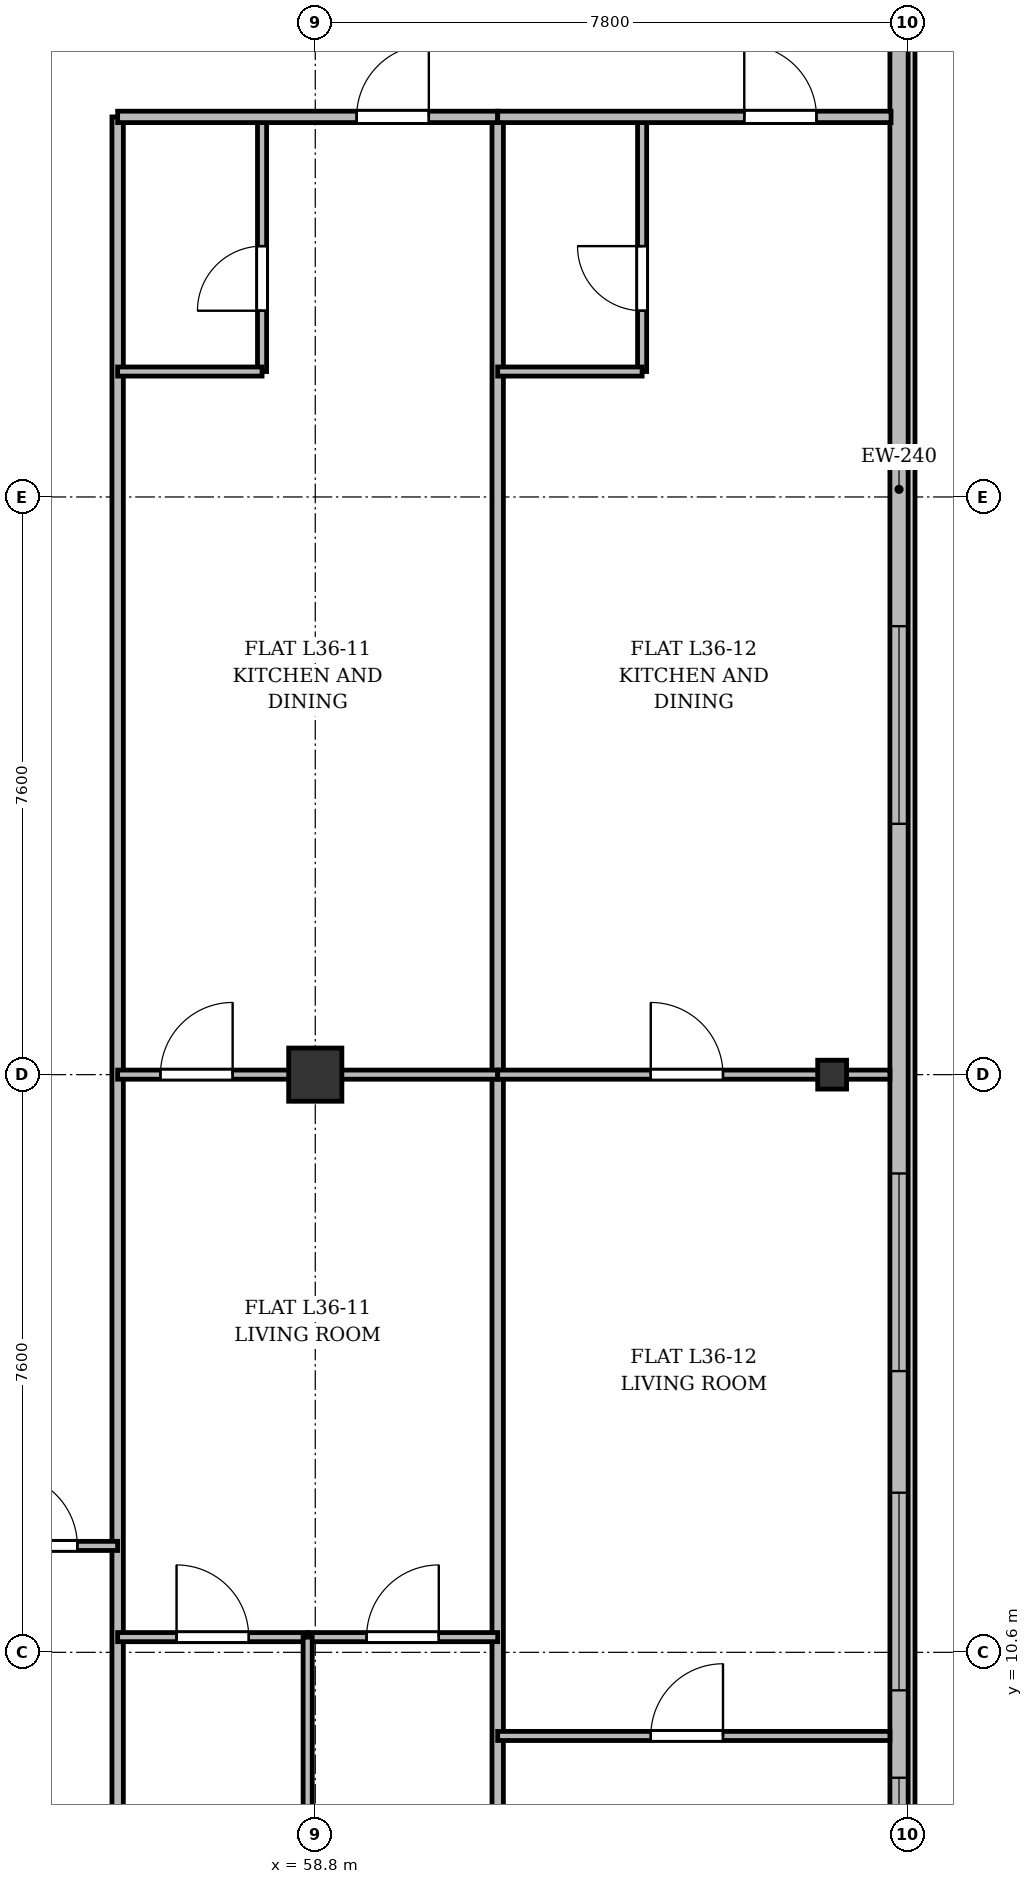
"""IFC4 building model, lengths in metres.
Left out: names, types, materials, properties, quantities, classifications, styles, units other than length and angle.
Written with IfcOpenShell. Run it as: python <this file> out.ifc"""

import sys

from ifc_helpers import new_model, si_unit, direction, frame, frame_2d, origin, origin_2d, place, context, subcontext, project, spatial, rectangle, i_section, extrude, source, transform, mapped, element, fill, save


model = new_model("IFC4")
c1 = context("Model", 3, precision=1e-05, world=origin(), true_north=direction((0.0, 1.0)))
c2 = subcontext(c1, "Body", "Model", "MODEL_VIEW")
j1 = project(units=[si_unit("LENGTHUNIT", "METRE"), si_unit("PLANEANGLEUNIT", "RADIAN")], contexts=[c1])
p1 = place(None, origin())
s1 = spatial("IfcSite", under=j1, at=p1, CompositionType="ELEMENT")
p2 = place(p1, origin())
s2 = spatial("IfcBuilding", under=s1, at=p2, CompositionType="ELEMENT")
p3 = place(p2, frame((0.0, 0.0, 139.3)))
s3 = spatial("IfcBuildingStorey", under=s2, at=p3, CompositionType="ELEMENT", Elevation=139.3)
m1 = source(origin(), c2, "Body", "SweptSolid", [
    extrude(rectangle(XDim=0.7, YDim=0.7, at=origin_2d()), origin(), (0.0, 0.0, 1.0), 3.6),
])
p4 = place(p3, frame((58.8, 18.2, 0.0), z_axis=(0.0, 0.0, 1.0), x_axis=(1.0, 0.0, 0.0)))
e1 = element("IfcColumn", 1, at=p4, inside=s3, PredefinedType="COLUMN", context=c2, shape_type="MappedRepresentation", body=[
    mapped(m1, transform((0.0, 0.0, 0.0), x_axis=(1.0, 0.0, 0.0), y_axis=(0.0, 1.0, 0.0), z_axis=(0.0, 0.0, 1.0), scale=1.0)),
])
m2 = source(origin(), c2, "Body", "SweptSolid", [
    extrude(i_section(OverallWidth=0.38, OverallDepth=0.38, WebThickness=0.02, FlangeThickness=0.03, at=origin_2d()), origin(), (0.0, 0.0, 1.0), 3.6),
])
p5 = place(p3, frame((65.6, 18.2, 0.0), z_axis=(0.0, 0.0, 1.0), x_axis=(1.0, 0.0, 0.0)))
e2 = element("IfcColumn", 2, at=p5, inside=s3, PredefinedType="COLUMN", context=c2, shape_type="MappedRepresentation", body=[
    mapped(m2, transform((0.0, 0.0, 0.0), x_axis=(1.0, 0.0, 0.0), y_axis=(0.0, 1.0, 0.0), z_axis=(0.0, 0.0, 1.0), scale=1.0)),
])
p6 = place(p3, frame((66.48, 45.5, 0.0), z_axis=(0.0, 0.0, 1.0), x_axis=(0.0, -1.0, 0.0)))
e3 = element("IfcWall", 3, at=p6, inside=s3, PredefinedType="SOLIDWALL", context=c2, shape_type="SweptSolid", body=[
    extrude(rectangle(XDim=39.2, YDim=0.24, at=frame_2d((19.6, 0.0))), origin(), (0.0, 0.0, 1.0), 3.35),
])
p7 = place(p6, frame((36.55, 0.0, 0.92)))
e4 = element("IfcOpeningElement", 4, at=p7, cuts=e3, PredefinedType="OPENING", context=c2, shape_type="SweptSolid", body=[
    extrude(rectangle(XDim=1.2, YDim=1.65, at=frame_2d((0.6, 0.825))), frame((0.0, 0.13, 0.0), z_axis=(0.0, -1.0, 0.0), x_axis=(1.0, 0.0, 0.0)), (0.0, 0.0, 1.0), 0.26),
])
p8 = place(p6, frame((32.8, 0.0, 0.92)))
e5 = element("IfcOpeningElement", 5, at=p8, cuts=e3, PredefinedType="OPENING", context=c2, shape_type="SweptSolid", body=[
    extrude(rectangle(XDim=2.6, YDim=1.9, at=frame_2d((1.3, 0.95))), frame((0.0, 0.13, 0.0), z_axis=(0.0, -1.0, 0.0), x_axis=(1.0, 0.0, 0.0)), (0.0, 0.0, 1.0), 0.26),
])
p9 = place(p6, frame((28.6, 0.0, 0.92)))
e6 = element("IfcOpeningElement", 6, at=p9, cuts=e3, PredefinedType="OPENING", context=c2, shape_type="SweptSolid", body=[
    extrude(rectangle(XDim=2.6, YDim=1.9, at=frame_2d((1.3, 0.95))), frame((0.0, 0.13, 0.0), z_axis=(0.0, -1.0, 0.0), x_axis=(1.0, 0.0, 0.0)), (0.0, 0.0, 1.0), 0.26),
])
p10 = place(p6, frame((21.4, 0.0, 0.92)))
e7 = element("IfcOpeningElement", 7, at=p10, cuts=e3, PredefinedType="OPENING", context=c2, shape_type="SweptSolid", body=[
    extrude(rectangle(XDim=2.6, YDim=1.9, at=frame_2d((1.3, 0.95))), frame((0.0, 0.13, 0.0), z_axis=(0.0, -1.0, 0.0), x_axis=(1.0, 0.0, 0.0)), (0.0, 0.0, 1.0), 0.26),
])
p11 = place(p6, frame((7.4, 0.0, 0.92)))
e8 = element("IfcOpeningElement", 8, at=p11, cuts=e3, PredefinedType="OPENING", context=c2, shape_type="SweptSolid", body=[
    extrude(rectangle(XDim=2.6, YDim=1.9, at=frame_2d((1.3, 0.95))), frame((0.0, 0.13, 0.0), z_axis=(0.0, -1.0, 0.0), x_axis=(1.0, 0.0, 0.0)), (0.0, 0.0, 1.0), 0.26),
])
p12 = place(p6, frame((4.5, 0.0, 0.92)))
e9 = element("IfcOpeningElement", 9, at=p12, cuts=e3, PredefinedType="OPENING", context=c2, shape_type="SweptSolid", body=[
    extrude(rectangle(XDim=1.2, YDim=1.65, at=frame_2d((0.6, 0.825))), frame((0.0, 0.13, 0.0), z_axis=(0.0, -1.0, 0.0), x_axis=(1.0, 0.0, 0.0)), (0.0, 0.0, 1.0), 0.26),
])
p13 = place(p6, frame((1.15, 0.0, 0.92)))
e10 = element("IfcOpeningElement", 10, at=p13, cuts=e3, PredefinedType="OPENING", context=c2, shape_type="SweptSolid", body=[
    extrude(rectangle(XDim=1.2, YDim=1.65, at=frame_2d((0.6, 0.825))), frame((0.0, 0.13, 0.0), z_axis=(0.0, -1.0, 0.0), x_axis=(1.0, 0.0, 0.0)), (0.0, 0.0, 1.0), 0.26),
])
for number, where, z_axis, x_axis in (
    (11, (61.2, 3.525, 0.0), (0.0, 0.0, 1.0), (0.0, 1.0, 0.0)),
    (12, (56.2, 3.525, 0.0), (0.0, 0.0, 1.0), (0.0, 1.0, 0.0)),
):
    element("IfcWall", number, at=place(p3, frame(where, z_axis=z_axis, x_axis=x_axis)), inside=s3, PredefinedType="PARTITIONING", context=c2, shape_type="SweptSolid", body=[
        extrude(rectangle(XDim=27.275, YDim=0.15, at=frame_2d((13.638, 0.0))), origin(), (0.0, 0.0, 1.0), 2.75),
    ])
p14 = place(p3, frame((54.2, 12.0, 0.0), z_axis=(0.0, 0.0, 1.0), x_axis=(1.0, 0.0, 0.0)))
e13 = element("IfcWall", 13, at=p14, inside=s3, PredefinedType="PARTITIONING", context=c2, shape_type="SweptSolid", body=[
    extrude(rectangle(XDim=2.0, YDim=0.12, at=frame_2d((1.0, 0.0))), origin(), (0.0, 0.0, 1.0), 3.35),
])
p15 = place(p14, frame((0.52, 0.0, 0.0)))
e14 = element("IfcOpeningElement", 14, at=p15, cuts=e13, PredefinedType="OPENING", context=c2, shape_type="SweptSolid", body=[
    extrude(rectangle(XDim=0.95, YDim=2.15, at=frame_2d((0.475, 1.075))), frame((0.0, 0.07, 0.0), z_axis=(0.0, -1.0, 0.0), x_axis=(1.0, 0.0, 0.0)), (0.0, 0.0, 1.0), 0.14),
])
p16 = place(p3, frame((56.2, 18.2, 0.0), z_axis=(0.0, 0.0, 1.0), x_axis=(1.0, 0.0, 0.0)))
e15 = element("IfcWall", 15, at=p16, inside=s3, PredefinedType="PARTITIONING", context=c2, shape_type="SweptSolid", body=[
    extrude(rectangle(XDim=5.0, YDim=0.12, at=frame_2d((2.5, 0.0))), origin(), (0.0, 0.0, 1.0), 2.75),
])
p17 = place(p16, frame((0.563, 0.0, 0.0)))
e16 = element("IfcOpeningElement", 16, at=p17, cuts=e15, PredefinedType="OPENING", context=c2, shape_type="SweptSolid", body=[
    extrude(rectangle(XDim=0.95, YDim=2.15, at=frame_2d((0.475, 1.075))), frame((0.0, 0.07, 0.0), z_axis=(0.0, -1.0, 0.0), x_axis=(1.0, 0.0, 0.0)), (0.0, 0.0, 1.0), 0.14),
])
p18 = place(p3, frame((58.1, 27.45, 0.0), z_axis=(0.0, 0.0, 1.0), x_axis=(0.0, 1.0, 0.0)))
e17 = element("IfcWall", 17, at=p18, inside=s3, PredefinedType="PARTITIONING", context=c2, shape_type="SweptSolid", body=[
    extrude(rectangle(XDim=3.35, YDim=0.12, at=frame_2d((1.675, 0.0))), origin(), (0.0, 0.0, 1.0), 3.35),
])
p19 = place(p18, frame((0.8, 0.0, 0.0)))
e18 = element("IfcOpeningElement", 18, at=p19, cuts=e17, PredefinedType="OPENING", context=c2, shape_type="SweptSolid", body=[
    extrude(rectangle(XDim=0.85, YDim=2.1, at=frame_2d((0.425, 1.05))), frame((0.0, 0.07, 0.0), z_axis=(0.0, -1.0, 0.0), x_axis=(1.0, 0.0, 0.0)), (0.0, 0.0, 1.0), 0.14),
])
p20 = place(p3, frame((56.2, 27.45, 0.0), z_axis=(0.0, 0.0, 1.0), x_axis=(1.0, 0.0, 0.0)))
e19 = element("IfcWall", 19, at=p20, inside=s3, PredefinedType="PARTITIONING", context=c2, shape_type="SweptSolid", body=[
    extrude(rectangle(XDim=1.9, YDim=0.12, at=frame_2d((0.95, 0.0))), origin(), (0.0, 0.0, 1.0), 3.35),
])
p21 = place(p3, frame((56.2, 30.8, 0.0), z_axis=(0.0, 0.0, 1.0), x_axis=(1.0, 0.0, 0.0)))
e20 = element("IfcWall", 20, at=p21, inside=s3, PredefinedType="PARTITIONING", context=c2, shape_type="SweptSolid", body=[
    extrude(rectangle(XDim=5.0, YDim=0.15, at=frame_2d((2.5, 0.0))), origin(), (0.0, 0.0, 1.0), 2.85),
])
p22 = place(p21, frame((3.144, 0.0, 0.0)))
e21 = element("IfcOpeningElement", 21, at=p22, cuts=e20, PredefinedType="OPENING", context=c2, shape_type="SweptSolid", body=[
    extrude(rectangle(XDim=0.95, YDim=2.15, at=frame_2d((0.475, 1.075))), frame((0.0, 0.085, 0.0), z_axis=(0.0, -1.0, 0.0), x_axis=(1.0, 0.0, 0.0)), (0.0, 0.0, 1.0), 0.17),
])
p23 = place(p3, frame((56.2, 10.8, 0.0), z_axis=(0.0, 0.0, 1.0), x_axis=(1.0, 0.0, 0.0)))
e22 = element("IfcWall", 22, at=p23, inside=s3, PredefinedType="PARTITIONING", context=c2, shape_type="SweptSolid", body=[
    extrude(rectangle(XDim=2.5, YDim=0.12, at=frame_2d((1.25, 0.0))), origin(), (0.0, 0.0, 1.0), 3.0),
])
p24 = place(p23, frame((0.775, 0.0, 0.0)))
e23 = element("IfcOpeningElement", 23, at=p24, cuts=e22, PredefinedType="OPENING", context=c2, shape_type="SweptSolid", body=[
    extrude(rectangle(XDim=0.95, YDim=2.15, at=frame_2d((0.475, 1.075))), frame((0.0, 0.07, 0.0), z_axis=(0.0, -1.0, 0.0), x_axis=(1.0, 0.0, 0.0)), (0.0, 0.0, 1.0), 0.14),
])
p25 = place(p3, frame((58.7, 10.8, 0.0), z_axis=(0.0, 0.0, 1.0), x_axis=(1.0, 0.0, 0.0)))
e24 = element("IfcWall", 24, at=p25, inside=s3, PredefinedType="PARTITIONING", context=c2, shape_type="SweptSolid", body=[
    extrude(rectangle(XDim=2.5, YDim=0.12, at=frame_2d((1.25, 0.0))), origin(), (0.0, 0.0, 1.0), 2.85),
])
p26 = place(p25, frame((0.775, 0.0, 0.0)))
e25 = element("IfcOpeningElement", 25, at=p26, cuts=e24, PredefinedType="OPENING", context=c2, shape_type="SweptSolid", body=[
    extrude(rectangle(XDim=0.95, YDim=2.15, at=frame_2d((0.475, 1.075))), frame((0.0, 0.07, 0.0), z_axis=(0.0, -1.0, 0.0), x_axis=(1.0, 0.0, 0.0)), (0.0, 0.0, 1.0), 0.14),
])
p27 = place(p3, frame((58.7, 3.525, 0.0), z_axis=(0.0, 0.0, 1.0), x_axis=(0.0, 1.0, 0.0)))
e26 = element("IfcWall", 26, at=p27, inside=s3, PredefinedType="PARTITIONING", context=c2, shape_type="SweptSolid", body=[
    extrude(rectangle(XDim=7.275, YDim=0.12, at=frame_2d((3.638, 0.0))), origin(), (0.0, 0.0, 1.0), 2.75),
])
p28 = place(p3, frame((61.2, 18.2, 0.0), z_axis=(0.0, 0.0, 1.0), x_axis=(1.0, 0.0, 0.0)))
e27 = element("IfcWall", 27, at=p28, inside=s3, PredefinedType="PARTITIONING", context=c2, shape_type="SweptSolid", body=[
    extrude(rectangle(XDim=5.16, YDim=0.12, at=frame_2d((2.58, 0.0))), origin(), (0.0, 0.0, 1.0), 2.75),
])
p29 = place(p28, frame((2.014, 0.0, 0.0)))
e28 = element("IfcOpeningElement", 28, at=p29, cuts=e27, PredefinedType="OPENING", context=c2, shape_type="SweptSolid", body=[
    extrude(rectangle(XDim=0.95, YDim=2.15, at=frame_2d((0.475, 1.075))), frame((0.0, 0.07, 0.0), z_axis=(0.0, -1.0, 0.0), x_axis=(1.0, 0.0, 0.0)), (0.0, 0.0, 1.0), 0.14),
])
p30 = place(p3, frame((63.1, 27.45, 0.0), z_axis=(0.0, 0.0, 1.0), x_axis=(0.0, 1.0, 0.0)))
e29 = element("IfcWall", 29, at=p30, inside=s3, PredefinedType="PARTITIONING", context=c2, shape_type="SweptSolid", body=[
    extrude(rectangle(XDim=3.35, YDim=0.12, at=frame_2d((1.675, 0.0))), origin(), (0.0, 0.0, 1.0), 3.35),
])
p31 = place(p30, frame((0.8, 0.0, 0.0)))
e30 = element("IfcOpeningElement", 30, at=p31, cuts=e29, PredefinedType="OPENING", context=c2, shape_type="SweptSolid", body=[
    extrude(rectangle(XDim=0.85, YDim=2.1, at=frame_2d((0.425, 1.05))), frame((0.0, 0.07, 0.0), z_axis=(0.0, -1.0, 0.0), x_axis=(1.0, 0.0, 0.0)), (0.0, 0.0, 1.0), 0.14),
])
p32 = place(p3, frame((61.2, 27.45, 0.0), z_axis=(0.0, 0.0, 1.0), x_axis=(1.0, 0.0, 0.0)))
e31 = element("IfcWall", 31, at=p32, inside=s3, PredefinedType="PARTITIONING", context=c2, shape_type="SweptSolid", body=[
    extrude(rectangle(XDim=1.9, YDim=0.12, at=frame_2d((0.95, 0.0))), origin(), (0.0, 0.0, 1.0), 3.35),
])
p33 = place(p3, frame((61.2, 30.8, 0.0), z_axis=(0.0, 0.0, 1.0), x_axis=(1.0, 0.0, 0.0)))
e32 = element("IfcWall", 32, at=p33, inside=s3, PredefinedType="PARTITIONING", context=c2, shape_type="SweptSolid", body=[
    extrude(rectangle(XDim=5.175, YDim=0.15, at=frame_2d((2.587, 0.0))), origin(), (0.0, 0.0, 1.0), 2.85),
])
p34 = place(p33, frame((3.244, 0.0, 0.0)))
e33 = element("IfcOpeningElement", 33, at=p34, cuts=e32, PredefinedType="OPENING", context=c2, shape_type="SweptSolid", body=[
    extrude(rectangle(XDim=0.95, YDim=2.15, at=frame_2d((0.475, 1.075))), frame((0.0, 0.085, 0.0), z_axis=(0.0, -1.0, 0.0), x_axis=(1.0, 0.0, 0.0)), (0.0, 0.0, 1.0), 0.17),
])
p35 = place(p3, frame((61.2, 9.5, 0.0), z_axis=(0.0, 0.0, 1.0), x_axis=(1.0, 0.0, 0.0)))
e34 = element("IfcWall", 34, at=p35, inside=s3, PredefinedType="PARTITIONING", context=c2, shape_type="SweptSolid", body=[
    extrude(rectangle(XDim=5.16, YDim=0.12, at=frame_2d((2.58, 0.0))), origin(), (0.0, 0.0, 1.0), 2.85),
])
p36 = place(p35, frame((2.014, 0.0, 0.0)))
e35 = element("IfcOpeningElement", 35, at=p36, cuts=e34, PredefinedType="OPENING", context=c2, shape_type="SweptSolid", body=[
    extrude(rectangle(XDim=0.95, YDim=2.15, at=frame_2d((0.475, 1.075))), frame((0.0, 0.07, 0.0), z_axis=(0.0, -1.0, 0.0), x_axis=(1.0, 0.0, 0.0)), (0.0, 0.0, 1.0), 0.14),
])
m3 = source(origin(), c2, "Body", "SweptSolid", [
    extrude(rectangle(XDim=1.2, YDim=1.65, at=frame_2d((0.6, 0.825))), frame((0.0, 0.03, 0.0), z_axis=(0.0, -1.0, 0.0), x_axis=(1.0, 0.0, 0.0)), (0.0, 0.0, 1.0), 0.06),
])
p37 = place(p7, origin())
e36 = element("IfcWindow", 36, at=p37, inside=s3, PartitioningType="SINGLE_PANEL", PredefinedType="WINDOW", context=c2, shape_type="MappedRepresentation", body=[
    mapped(m3, transform((0.0, 0.0, 0.0), x_axis=(1.0, 0.0, 0.0), y_axis=(0.0, 1.0, 0.0), z_axis=(0.0, 0.0, 1.0), scale=1.0)),
])
fill(e4, e36)
m4 = source(origin(), c2, "Body", "SweptSolid", [
    extrude(rectangle(XDim=2.6, YDim=1.9, at=frame_2d((1.3, 0.95))), frame((0.0, 0.03, 0.0), z_axis=(0.0, -1.0, 0.0), x_axis=(1.0, 0.0, 0.0)), (0.0, 0.0, 1.0), 0.06),
])
p38 = place(p8, origin())
e37 = element("IfcWindow", 37, at=p38, inside=s3, PartitioningType="SINGLE_PANEL", PredefinedType="WINDOW", context=c2, shape_type="MappedRepresentation", body=[
    mapped(m4, transform((0.0, 0.0, 0.0), x_axis=(1.0, 0.0, 0.0), y_axis=(0.0, 1.0, 0.0), z_axis=(0.0, 0.0, 1.0), scale=1.0)),
])
fill(e5, e37)
p39 = place(p9, origin())
e38 = element("IfcWindow", 38, at=p39, inside=s3, PartitioningType="SINGLE_PANEL", PredefinedType="WINDOW", context=c2, shape_type="MappedRepresentation", body=[
    mapped(m4, transform((0.0, 0.0, 0.0), x_axis=(1.0, 0.0, 0.0), y_axis=(0.0, 1.0, 0.0), z_axis=(0.0, 0.0, 1.0), scale=1.0)),
])
fill(e6, e38)
p40 = place(p10, origin())
e39 = element("IfcWindow", 39, at=p40, inside=s3, PartitioningType="SINGLE_PANEL", PredefinedType="WINDOW", context=c2, shape_type="MappedRepresentation", body=[
    mapped(m4, transform((0.0, 0.0, 0.0), x_axis=(1.0, 0.0, 0.0), y_axis=(0.0, 1.0, 0.0), z_axis=(0.0, 0.0, 1.0), scale=1.0)),
])
fill(e7, e39)
m5 = source(origin(), c2, "Body", "SweptSolid", [
    extrude(rectangle(XDim=0.95, YDim=2.15, at=frame_2d((0.475, 1.075))), frame((0.0, 0.025, 0.0), z_axis=(0.0, -1.0, 0.0), x_axis=(1.0, 0.0, 0.0)), (0.0, 0.0, 1.0), 0.05),
])
p41 = place(p15, origin())
e40 = element("IfcDoor", 40, at=p41, inside=s3, OperationType="SINGLE_SWING_LEFT", PredefinedType="DOOR", context=c2, shape_type="MappedRepresentation", body=[
    mapped(m5, transform((0.0, 0.0, 0.0), x_axis=(1.0, 0.0, 0.0), y_axis=(0.0, 1.0, 0.0), z_axis=(0.0, 0.0, 1.0), scale=1.0)),
])
fill(e14, e40)
p42 = place(p17, origin())
e41 = element("IfcDoor", 41, at=p42, inside=s3, OperationType="SINGLE_SWING_RIGHT", PredefinedType="DOOR", context=c2, shape_type="MappedRepresentation", body=[
    mapped(m5, transform((0.0, 0.0, 0.0), x_axis=(1.0, 0.0, 0.0), y_axis=(0.0, 1.0, 0.0), z_axis=(0.0, 0.0, 1.0), scale=1.0)),
])
fill(e16, e41)
m6 = source(origin(), c2, "Body", "SweptSolid", [
    extrude(rectangle(XDim=0.85, YDim=2.1, at=frame_2d((0.425, 1.05))), frame((0.0, 0.025, 0.0), z_axis=(0.0, -1.0, 0.0), x_axis=(1.0, 0.0, 0.0)), (0.0, 0.0, 1.0), 0.05),
])
p43 = place(p19, origin())
e42 = element("IfcDoor", 42, at=p43, inside=s3, OperationType="SINGLE_SWING_LEFT", PredefinedType="DOOR", context=c2, shape_type="MappedRepresentation", body=[
    mapped(m6, transform((0.0, 0.0, 0.0), x_axis=(1.0, 0.0, 0.0), y_axis=(0.0, 1.0, 0.0), z_axis=(0.0, 0.0, 1.0), scale=1.0)),
])
fill(e18, e42)
p44 = place(p22, origin())
e43 = element("IfcDoor", 43, at=p44, inside=s3, OperationType="SINGLE_SWING_RIGHT", PredefinedType="DOOR", context=c2, shape_type="MappedRepresentation", body=[
    mapped(m5, transform((0.0, 0.0, 0.0), x_axis=(1.0, 0.0, 0.0), y_axis=(0.0, 1.0, 0.0), z_axis=(0.0, 0.0, 1.0), scale=1.0)),
])
fill(e21, e43)
p45 = place(p24, origin())
e44 = element("IfcDoor", 44, at=p45, inside=s3, OperationType="SINGLE_SWING_LEFT", PredefinedType="DOOR", context=c2, shape_type="MappedRepresentation", body=[
    mapped(m5, transform((0.0, 0.0, 0.0), x_axis=(1.0, 0.0, 0.0), y_axis=(0.0, 1.0, 0.0), z_axis=(0.0, 0.0, 1.0), scale=1.0)),
])
fill(e23, e44)
p46 = place(p26, origin())
e45 = element("IfcDoor", 45, at=p46, inside=s3, OperationType="SINGLE_SWING_RIGHT", PredefinedType="DOOR", context=c2, shape_type="MappedRepresentation", body=[
    mapped(m5, transform((0.0, 0.0, 0.0), x_axis=(1.0, 0.0, 0.0), y_axis=(0.0, 1.0, 0.0), z_axis=(0.0, 0.0, 1.0), scale=1.0)),
])
fill(e25, e45)
p47 = place(p29, origin())
e46 = element("IfcDoor", 46, at=p47, inside=s3, OperationType="SINGLE_SWING_LEFT", PredefinedType="DOOR", context=c2, shape_type="MappedRepresentation", body=[
    mapped(m5, transform((0.0, 0.0, 0.0), x_axis=(1.0, 0.0, 0.0), y_axis=(0.0, 1.0, 0.0), z_axis=(0.0, 0.0, 1.0), scale=1.0)),
])
fill(e28, e46)
p48 = place(p31, origin())
e47 = element("IfcDoor", 47, at=p48, inside=s3, OperationType="SINGLE_SWING_RIGHT", PredefinedType="DOOR", context=c2, shape_type="MappedRepresentation", body=[
    mapped(m6, transform((0.0, 0.0, 0.0), x_axis=(1.0, 0.0, 0.0), y_axis=(0.0, 1.0, 0.0), z_axis=(0.0, 0.0, 1.0), scale=1.0)),
])
fill(e30, e47)
p49 = place(p34, origin())
e48 = element("IfcDoor", 48, at=p49, inside=s3, OperationType="SINGLE_SWING_LEFT", PredefinedType="DOOR", context=c2, shape_type="MappedRepresentation", body=[
    mapped(m5, transform((0.0, 0.0, 0.0), x_axis=(1.0, 0.0, 0.0), y_axis=(0.0, 1.0, 0.0), z_axis=(0.0, 0.0, 1.0), scale=1.0)),
])
fill(e33, e48)
p50 = place(p36, origin())
e49 = element("IfcDoor", 49, at=p50, inside=s3, OperationType="SINGLE_SWING_RIGHT", PredefinedType="DOOR", context=c2, shape_type="MappedRepresentation", body=[
    mapped(m5, transform((0.0, 0.0, 0.0), x_axis=(1.0, 0.0, 0.0), y_axis=(0.0, 1.0, 0.0), z_axis=(0.0, 0.0, 1.0), scale=1.0)),
])
fill(e35, e49)
save(model, sys.argv[1])
